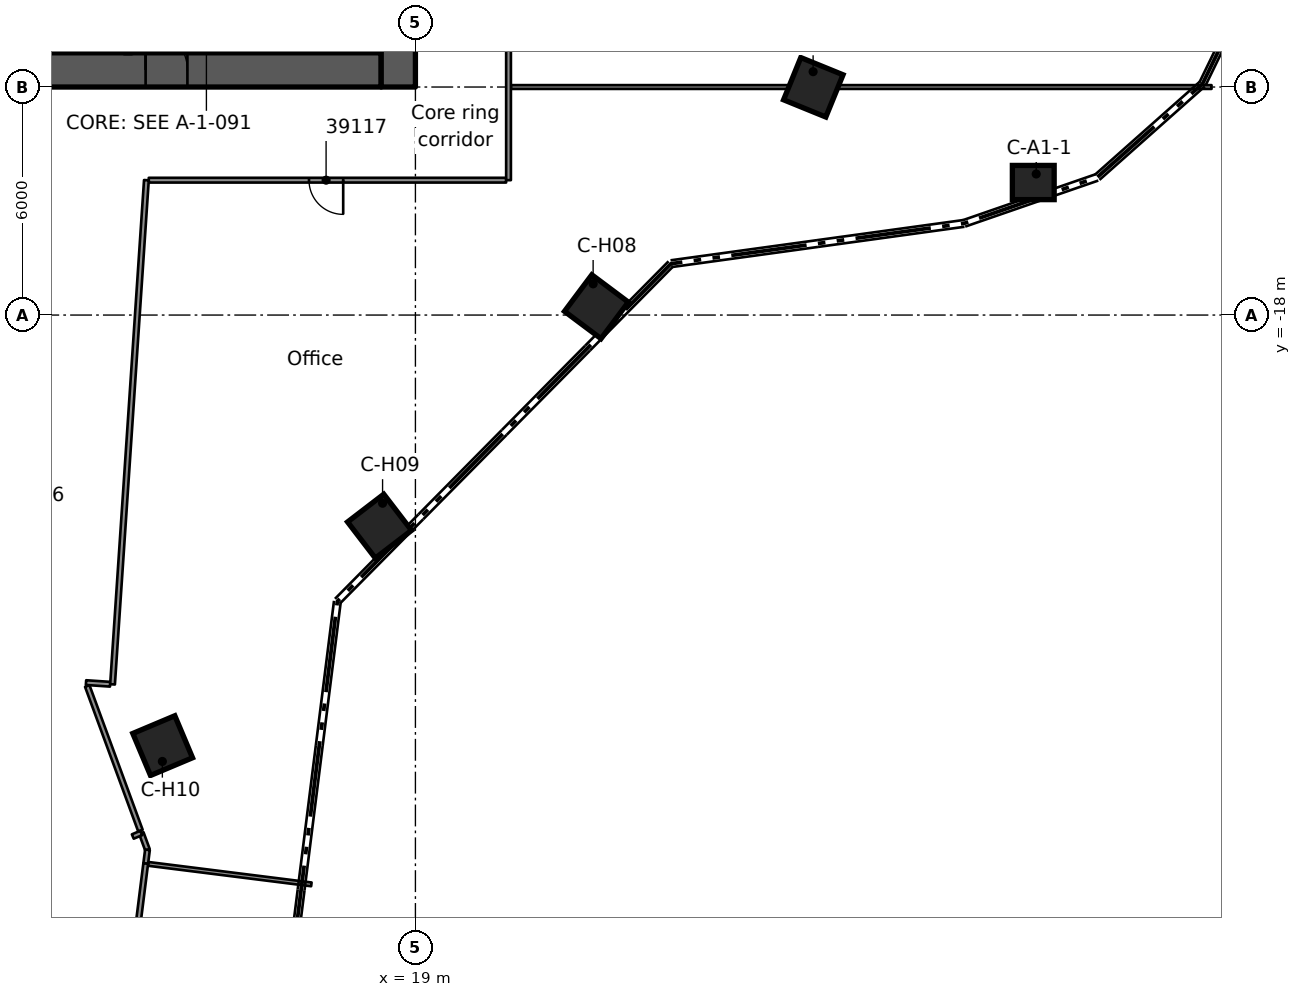
"""IFC4 building model, lengths in metres.
Left out: names, types, materials, properties, quantities, classifications, styles, units other than length and angle.
Written with IfcOpenShell. Run it as: python <this file> out.ifc"""

import sys

from ifc_helpers import new_model, si_unit, direction, frame, frame_2d, origin, origin_2d, place, context, subcontext, project, spatial, rectangle, extrude, element, fill, save


model = new_model("IFC4")
c1 = context("Model", 3, precision=1e-05, world=origin(), true_north=direction((0.0, 1.0)))
c2 = subcontext(c1, "Body", "Model", "MODEL_VIEW")
j1 = project(units=[si_unit("LENGTHUNIT", "METRE"), si_unit("PLANEANGLEUNIT", "RADIAN")], contexts=[c1])
p1 = place(None, origin())
s1 = spatial("IfcSite", under=j1, at=p1, CompositionType="ELEMENT")
p2 = place(p1, origin())
s2 = spatial("IfcBuilding", under=s1, at=p2, CompositionType="ELEMENT")
p3 = place(p2, frame((0.0, 0.0, 192.1)))
s3 = spatial("IfcBuildingStorey", under=s2, at=p3, CompositionType="ELEMENT", Elevation=192.1)
p4 = place(p3, frame((8.9, -11.55, 0.0), z_axis=(0.0, 0.0, 1.0), x_axis=(1.0, 0.0, 0.0)))
e1 = element("IfcWall", 1, at=p4, inside=s3, PredefinedType="SHEAR", context=c2, shape_type="SweptSolid", body=[
    extrude(rectangle(XDim=9.2, YDim=0.9, at=frame_2d((4.6, 0.0))), origin(), (0.0, 0.0, 1.0), 3.5),
])
p5 = place(p4, frame((3.0, 0.0, 0.0)))
e2 = element("IfcOpeningElement", 2, at=p5, cuts=e1, PredefinedType="OPENING", context=c2, shape_type="SweptSolid", body=[
    extrude(rectangle(XDim=1.1, YDim=2.1, at=frame_2d((0.55, 1.05))), frame((0.0, 0.46, 0.0), z_axis=(0.0, -1.0, 0.0), x_axis=(1.0, 0.0, 0.0)), (0.0, 0.0, 1.0), 0.92),
])
p6 = place(p3, frame((18.55, -12.0, 0.0), z_axis=(0.0, 0.0, 1.0), x_axis=(0.0, 1.0, 0.0)))
e3 = element("IfcWall", 3, at=p6, inside=s3, PredefinedType="SHEAR", context=c2, shape_type="SweptSolid", body=[
    extrude(rectangle(XDim=24.0, YDim=0.9, at=frame_2d((12.0, 0.0))), origin(), (0.0, 0.0, 1.0), 3.5),
])
p7 = place(p6, frame((12.1, 0.0, 0.0)))
e4 = element("IfcOpeningElement", 4, at=p7, cuts=e3, PredefinedType="OPENING", context=c2, shape_type="SweptSolid", body=[
    extrude(rectangle(XDim=1.8, YDim=2.1, at=frame_2d((0.9, 1.05))), frame((0.0, 0.46, 0.0), z_axis=(0.0, -1.0, 0.0), x_axis=(1.0, 0.0, 0.0)), (0.0, 0.0, 1.0), 0.92),
])
p8 = place(p3, frame((35.258, -14.513, 0.0), z_axis=(0.0, 0.0, 1.0), x_axis=(1.0, 0.0, 0.0)))
e5 = element("IfcColumn", 5, at=p8, inside=s3, PredefinedType="COLUMN", context=c2, shape_type="SweptSolid", body=[
    extrude(rectangle(XDim=1.1, YDim=0.9, at=origin_2d()), origin(), (0.0, 0.0, 1.0), 3.5),
])
for number, where, z_axis, x_axis in (
    (6, (29.47, -12.007, 0.0), (0.0, 0.0, 1.0), (0.926, -0.377, 0.0)),
    (7, (23.763, -17.781, 0.0), (0.0, 0.0, 1.0), (0.801, -0.599, 0.0)),
    (8, (18.056, -23.555, 0.0), (0.0, 0.0, 1.0), (0.608, -0.794, 0.0)),
    (9, (12.349, -29.329, 0.0), (0.0, 0.0, 1.0), (0.388, -0.922, 0.0)),
):
    element("IfcColumn", number, at=place(p3, frame(where, z_axis=z_axis, x_axis=x_axis)), inside=s3, PredefinedType="COLUMN", context=c2, shape_type="SweptSolid", body=[
        extrude(rectangle(XDim=1.2, YDim=1.2, at=origin_2d()), origin(), (0.0, 0.0, 1.0), 3.5),
    ])
p9 = place(p3, frame((11.44, -6.975, 0.0), z_axis=(0.0, 0.0, 1.0), x_axis=(0.0, -1.0, 0.0)))
e10 = element("IfcWall", 10, at=p9, inside=s3, PredefinedType="SOLIDWALL", context=c2, shape_type="SweptSolid", body=[
    extrude(rectangle(XDim=4.125, YDim=0.2, at=frame_2d((2.062, 0.0))), origin(), (0.0, 0.0, 1.0), 3.08),
])
p10 = place(p9, frame((2.1, 0.0, 0.0)))
e11 = element("IfcOpeningElement", 11, at=p10, cuts=e10, PredefinedType="OPENING", context=c2, shape_type="SweptSolid", body=[
    extrude(rectangle(XDim=1.1, YDim=2.1, at=frame_2d((0.55, 1.05))), frame((0.0, 0.11, 0.0), z_axis=(0.0, -1.0, 0.0), x_axis=(1.0, 0.0, 0.0)), (0.0, 0.0, 1.0), 0.22),
])
p11 = place(p3, frame((11.786, -31.628, 0.0), z_axis=(0.0, 0.0, 1.0), x_axis=(0.346065449672, -0.938210373287, 0.0)))
e12 = element("IfcWall", 12, at=p11, inside=s3, PredefinedType="PARTITIONING", context=c2, shape_type="SweptSolid", body=[
    extrude(rectangle(XDim=0.471, YDim=0.125, at=frame_2d((0.236, 0.0))), origin(), (0.0, 0.0, 1.0), 3.06),
])
p12 = place(p3, frame((10.365, -27.761, 0.0), z_axis=(0.0, 0.0, 1.0), x_axis=(0.34515538391, -0.938545556144, 0.0)))
e13 = element("IfcWall", 13, at=p12, inside=s3, PredefinedType="PARTITIONING", context=c2, shape_type="SweptSolid", body=[
    extrude(rectangle(XDim=4.053, YDim=0.125, at=frame_2d((2.026, 0.0))), origin(), (0.0, 0.0, 1.0), 3.06),
])
p13 = place(p3, frame((11.965, -32.44, 0.0), z_axis=(0.0, 0.0, 1.0), x_axis=(0.992194392082, -0.124700795187, 0.0)))
e14 = element("IfcWall", 14, at=p13, inside=s3, PredefinedType="PARTITIONING", context=c2, shape_type="SweptSolid", body=[
    extrude(rectangle(XDim=4.331, YDim=0.1, at=frame_2d((2.165, 0.0))), origin(), (0.0, 0.0, 1.0), 3.06),
])
p14 = place(p3, frame((10.332, -27.671, 0.0), z_axis=(0.0, 0.0, 1.0), x_axis=(0.997692558801, -0.067893726608, 0.0)))
e15 = element("IfcWall", 15, at=p14, inside=s3, PredefinedType="PARTITIONING", context=c2, shape_type="SweptSolid", body=[
    extrude(rectangle(XDim=0.636, YDim=0.125, at=frame_2d((0.318, 0.0))), origin(), (0.0, 0.0, 1.0), 3.06),
])
p15 = place(p3, frame((21.387, -14.451, 0.0), z_axis=(0.0, 0.0, 1.0), x_axis=(-1.0, 0.0, 0.0)))
e16 = element("IfcWall", 16, at=p15, inside=s3, PredefinedType="PARTITIONING", context=c2, shape_type="SweptSolid", body=[
    extrude(rectangle(XDim=9.404, YDim=0.125, at=frame_2d((4.702, 0.0))), origin(), (0.0, 0.0, 1.0), 3.06),
])
p16 = place(p15, frame((4.288, 0.0, 0.0)))
e17 = element("IfcOpeningElement", 17, at=p16, cuts=e16, PredefinedType="OPENING", context=c2, shape_type="SweptSolid", body=[
    extrude(rectangle(XDim=0.9, YDim=2.1, at=frame_2d((0.45, 1.05))), frame((0.0, 0.073, 0.0), z_axis=(0.0, -1.0, 0.0), x_axis=(1.0, 0.0, 0.0)), (0.0, 0.0, 1.0), 0.145),
])
p17 = place(p3, frame((21.512, -12.0, 0.0), z_axis=(0.0, 0.0, 1.0), x_axis=(1.0, 0.0, 0.0)))
e18 = element("IfcWall", 18, at=p17, inside=s3, PredefinedType="PARTITIONING", context=c2, shape_type="SweptSolid", body=[
    extrude(rectangle(XDim=18.437, YDim=0.1, at=frame_2d((9.219, 0.0))), origin(), (0.0, 0.0, 1.0), 3.06),
])
p18 = place(p3, frame((11.563, -31.721, 0.0), z_axis=(0.0, 0.0, 1.0), x_axis=(0.921426271694, 0.3885532471, 0.0)))
e19 = element("IfcWall", 19, at=p18, inside=s3, PredefinedType="PARTITIONING", context=c2, shape_type="SweptSolid", body=[
    extrude(rectangle(XDim=0.242, YDim=0.125, at=frame_2d((0.121, 0.0))), origin(), (0.0, 0.0, 1.0), 3.06),
])
p19 = place(p3, frame((11.903, -32.432, 0.0), z_axis=(0.0, 0.0, 1.0), x_axis=(0.125847054802, 0.992049655409, 0.0)))
e20 = element("IfcWall", 20, at=p19, inside=s3, PredefinedType="PARTITIONING", context=c2, shape_type="SweptSolid", body=[
    extrude(rectangle(XDim=0.365, YDim=0.125, at=frame_2d((0.182, 0.0))), origin(), (0.0, 0.0, 1.0), 3.06),
])
p20 = place(p3, frame((11.903, -32.432, 0.0), z_axis=(0.0, 0.0, 1.0), x_axis=(-0.124726255985, -0.992191191791, 0.0)))
e21 = element("IfcWall", 21, at=p20, inside=s3, PredefinedType="PARTITIONING", context=c2, shape_type="SweptSolid", body=[
    extrude(rectangle(XDim=3.954, YDim=0.125, at=frame_2d((1.977, 0.0))), origin(), (0.0, 0.0, 1.0), 3.06),
])
p21 = place(p20, frame((1.6, 0.0, 0.0)))
e22 = element("IfcOpeningElement", 22, at=p21, cuts=e21, PredefinedType="OPENING", context=c2, shape_type="SweptSolid", body=[
    extrude(rectangle(XDim=0.9, YDim=2.1, at=frame_2d((0.45, 1.05))), frame((0.0, 0.073, 0.0), z_axis=(0.0, -1.0, 0.0), x_axis=(1.0, 0.0, 0.0)), (0.0, 0.0, 1.0), 0.145),
])
p22 = place(p3, frame((11.03, -27.717, 0.0), z_axis=(0.0, 0.0, 1.0), x_axis=(0.067002832517, 0.99775278523, 0.0)))
e23 = element("IfcWall", 23, at=p22, inside=s3, PredefinedType="PARTITIONING", context=c2, shape_type="SweptSolid", body=[
    extrude(rectangle(XDim=13.296, YDim=0.125, at=frame_2d((6.648, 0.0))), origin(), (0.0, 0.0, 1.0), 3.06),
])
p23 = place(p3, frame((21.45, 14.451, 0.0), z_axis=(0.0, 0.0, 1.0), x_axis=(0.0, -1.0, 0.0)))
e24 = element("IfcWall", 24, at=p23, inside=s3, PredefinedType="PARTITIONING", context=c2, shape_type="SweptSolid", body=[
    extrude(rectangle(XDim=28.902, YDim=0.125, at=frame_2d((14.451, 0.0))), origin(), (0.0, 0.0, 1.0), 3.06),
])
p24 = place(p23, frame((23.051, 0.0, 0.0)))
e25 = element("IfcOpeningElement", 25, at=p24, cuts=e24, PredefinedType="OPENING", context=c2, shape_type="SweptSolid", body=[
    extrude(rectangle(XDim=0.9, YDim=2.1, at=frame_2d((0.45, 1.05))), frame((0.0, 0.073, 0.0), z_axis=(0.0, -1.0, 0.0), x_axis=(1.0, 0.0, 0.0)), (0.0, 0.0, 1.0), 0.145),
])
p25 = place(p23, frame((17.051, 0.0, 0.0)))
e26 = element("IfcOpeningElement", 26, at=p25, cuts=e24, PredefinedType="OPENING", context=c2, shape_type="SweptSolid", body=[
    extrude(rectangle(XDim=0.9, YDim=2.1, at=frame_2d((0.45, 1.05))), frame((0.0, 0.073, 0.0), z_axis=(0.0, -1.0, 0.0), x_axis=(1.0, 0.0, 0.0)), (0.0, 0.0, 1.0), 0.145),
])
p26 = place(p23, frame((11.051, 0.0, 0.0)))
e27 = element("IfcOpeningElement", 27, at=p26, cuts=e24, PredefinedType="OPENING", context=c2, shape_type="SweptSolid", body=[
    extrude(rectangle(XDim=0.9, YDim=2.1, at=frame_2d((0.45, 1.05))), frame((0.0, 0.073, 0.0), z_axis=(0.0, -1.0, 0.0), x_axis=(1.0, 0.0, 0.0)), (0.0, 0.0, 1.0), 0.145),
])
p27 = place(p23, frame((4.801, 0.0, 0.0)))
e28 = element("IfcOpeningElement", 28, at=p27, cuts=e24, PredefinedType="OPENING", context=c2, shape_type="SweptSolid", body=[
    extrude(rectangle(XDim=1.1, YDim=2.1, at=frame_2d((0.55, 1.05))), frame((0.0, 0.073, 0.0), z_axis=(0.0, -1.0, 0.0), x_axis=(1.0, 0.0, 0.0)), (0.0, 0.0, 1.0), 0.145),
])
p28 = place(p5, origin())
e29 = element("IfcDoor", 29, at=p28, inside=s3, OperationType="SINGLE_SWING_LEFT", PredefinedType="DOOR", context=c2, shape_type="SweptSolid", body=[
    extrude(rectangle(XDim=1.1, YDim=2.1, at=frame_2d((0.55, 1.05))), frame((0.0, 0.025, 0.0), z_axis=(0.0, -1.0, 0.0), x_axis=(1.0, 0.0, 0.0)), (0.0, 0.0, 1.0), 0.05),
])
fill(e2, e29)
p29 = place(p16, origin())
e30 = element("IfcDoor", 30, at=p29, inside=s3, OperationType="SINGLE_SWING_RIGHT", PredefinedType="DOOR", context=c2, shape_type="SweptSolid", body=[
    extrude(rectangle(XDim=0.9, YDim=2.1, at=frame_2d((0.45, 1.05))), frame((0.0, 0.025, 0.0), z_axis=(0.0, -1.0, 0.0), x_axis=(1.0, 0.0, 0.0)), (0.0, 0.0, 1.0), 0.05),
])
fill(e17, e30)
save(model, sys.argv[1])
